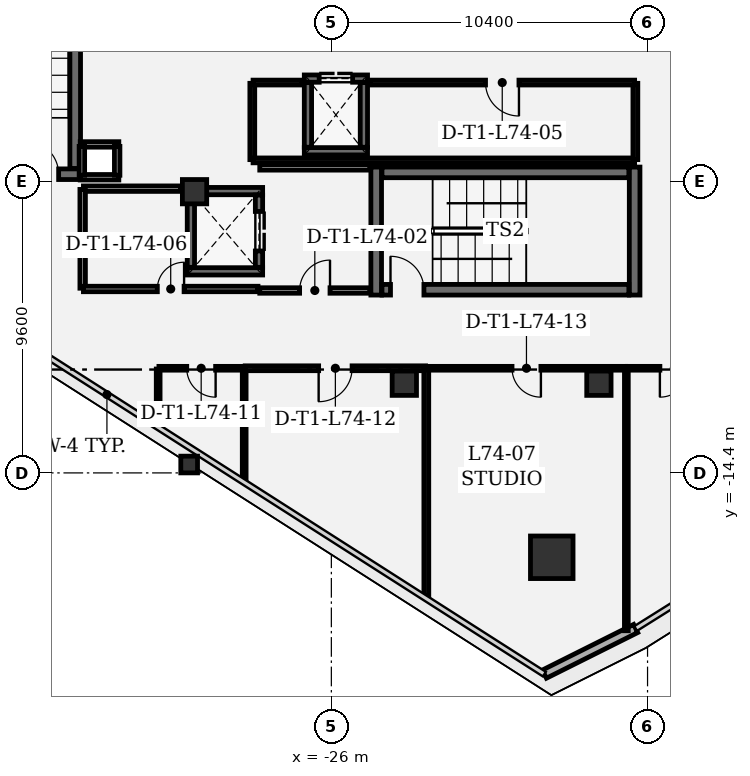
"""IFC4 building model, lengths in metres.
Left out: names, types, materials, properties, quantities, classifications, styles, units other than length and angle.
Written with IfcOpenShell. Run it as: python <this file> out.ifc"""

import sys

from ifc_helpers import new_model, si_unit, direction, frame, frame_2d, origin, origin_2d, place, context, subcontext, project, spatial, rectangle, extrude, element, fill, save


model = new_model("IFC4")
c1 = context("Model", 3, precision=1e-05, world=origin(), true_north=direction((0.0, 1.0)))
c2 = subcontext(c1, "Body", "Model", "MODEL_VIEW")
j1 = project(units=[si_unit("LENGTHUNIT", "METRE"), si_unit("PLANEANGLEUNIT", "RADIAN")], contexts=[c1])
p1 = place(None, origin())
s1 = spatial("IfcSite", under=j1, at=p1, CompositionType="ELEMENT")
p2 = place(p1, origin())
s2 = spatial("IfcBuilding", under=s1, at=p2, CompositionType="ELEMENT")
p3 = place(p2, frame((0.0, 0.0, 318.6)))
s3 = spatial("IfcBuildingStorey", under=s2, at=p3, CompositionType="ELEMENT", Elevation=318.6)
p4 = place(p3, frame((-18.75, -17.176, 0.0), z_axis=(0.0, 0.0, 1.0), x_axis=(1.0, 0.0, 0.0)))
e1 = element("IfcColumn", 1, at=p4, inside=s3, PredefinedType="COLUMN", context=c2, shape_type="SweptSolid", body=[
    extrude(rectangle(XDim=1.4, YDim=1.4, at=origin_2d()), origin(), (0.0, 0.0, 1.0), 4.2),
])
for number, where, z_axis, x_axis in (
    (2, (-17.2, -11.45, 0.0), (0.0, 0.0, 1.0), (1.0, 0.0, 0.0)),
    (3, (-23.6, -11.45, 0.0), (0.0, 0.0, 1.0), (1.0, 0.0, 0.0)),
    (4, (-30.5, -5.15, 0.0), (0.0, 0.0, 1.0), (1.0, 0.0, 0.0)),
):
    element("IfcColumn", number, at=place(p3, frame(where, z_axis=z_axis, x_axis=x_axis)), inside=s3, PredefinedType="COLUMN", context=c2, shape_type="SweptSolid", body=[
        extrude(rectangle(XDim=0.8, YDim=0.8, at=origin_2d()), origin(), (0.0, 0.0, 1.0), 4.2),
    ])
p5 = place(p3, frame((-30.677, -14.124, 0.0), z_axis=(0.0, 0.0, 1.0), x_axis=(1.0, 0.0, 0.0)))
e5 = element("IfcColumn", 5, at=p5, inside=s3, PredefinedType="COLUMN", context=c2, shape_type="SweptSolid", body=[
    extrude(rectangle(XDim=0.55, YDim=0.55, at=origin_2d()), origin(), (0.0, 0.0, 1.0), 4.2),
])
p6 = place(p3, frame((-15.991, -19.518, 0.0), z_axis=(0.0, 0.0, 1.0), x_axis=(-0.894441735477, -0.447184505362, 0.0)))
e6 = element("IfcWall", 6, at=p6, inside=s3, PredefinedType="SOLIDWALL", context=c2, shape_type="SweptSolid", body=[
    extrude(rectangle(XDim=3.357, YDim=0.3, at=frame_2d((1.678, 0.0))), origin(), (0.0, 0.0, 1.0), 3.91),
])
for number, where, z_axis, x_axis in (
    (7, (-24.525, -4.34, 0.0), (0.0, 0.0, 1.0), (0.0, -1.0, 0.0)),
    (8, (-16.025, -8.55, 0.0), (0.0, 0.0, 1.0), (0.0, 1.0, 0.0)),
):
    element("IfcWall", number, at=place(p3, frame(where, z_axis=z_axis, x_axis=x_axis)), inside=s3, PredefinedType="SHEAR", context=c2, shape_type="SweptSolid", body=[
        extrude(rectangle(XDim=4.21, YDim=0.35, at=frame_2d((2.105, 0.0))), origin(), (0.0, 0.0, 1.0), 3.91),
    ])
p7 = place(p3, frame((-24.335, -8.375, 0.0), z_axis=(0.0, 0.0, 1.0), x_axis=(1.0, 0.0, 0.0)))
e9 = element("IfcWall", 9, at=p7, inside=s3, PredefinedType="SHEAR", context=c2, shape_type="SweptSolid", body=[
    extrude(rectangle(XDim=8.12, YDim=0.35, at=frame_2d((4.06, 0.0))), origin(), (0.0, 0.0, 1.0), 3.91),
])
p8 = place(p7, frame((0.28, 0.0, 0.0)))
e10 = element("IfcOpeningElement", 10, at=p8, cuts=e9, PredefinedType="OPENING", context=c2, shape_type="SweptSolid", body=[
    extrude(rectangle(XDim=1.1, YDim=2.2, at=frame_2d((0.55, 1.1))), frame((0.0, 0.185, 0.0), z_axis=(0.0, -1.0, 0.0), x_axis=(1.0, 0.0, 0.0)), (0.0, 0.0, 1.0), 0.37),
])
p9 = place(p3, frame((-16.215, -4.515, 0.0), z_axis=(0.0, 0.0, 1.0), x_axis=(-1.0, 0.0, 0.0)))
e11 = element("IfcWall", 11, at=p9, inside=s3, PredefinedType="SHEAR", context=c2, shape_type="SweptSolid", body=[
    extrude(rectangle(XDim=8.12, YDim=0.35, at=frame_2d((4.06, 0.0))), origin(), (0.0, 0.0, 1.0), 3.91),
])
p10 = place(p3, frame((-38.46, -4.575, 0.0), z_axis=(0.0, 0.0, 1.0), x_axis=(1.0, 0.0, 0.0)))
e12 = element("IfcWall", 12, at=p10, inside=s3, PredefinedType="SHEAR", context=c2, shape_type="SweptSolid", body=[
    extrude(rectangle(XDim=4.21, YDim=0.35, at=frame_2d((2.105, 0.0))), origin(), (0.0, 0.0, 1.0), 3.91),
])
p11 = place(p10, frame((2.39, 0.0, 0.0)))
e13 = element("IfcOpeningElement", 13, at=p11, cuts=e12, PredefinedType="OPENING", context=c2, shape_type="SweptSolid", body=[
    extrude(rectangle(XDim=1.1, YDim=2.2, at=frame_2d((0.55, 1.1))), frame((0.0, 0.185, 0.0), z_axis=(0.0, -1.0, 0.0), x_axis=(1.0, 0.0, 0.0)), (0.0, 0.0, 1.0), 0.37),
])
p12 = place(p3, frame((-34.425, -4.385, 0.0), z_axis=(0.0, 0.0, 1.0), x_axis=(0.0, 1.0, 0.0)))
e14 = element("IfcWall", 14, at=p12, inside=s3, PredefinedType="SHEAR", context=c2, shape_type="SweptSolid", body=[
    extrude(rectangle(XDim=8.77, YDim=0.35, at=frame_2d((4.385, 0.0))), origin(), (0.0, 0.0, 1.0), 3.91),
])
for number, where, z_axis, x_axis in (
    (15, (-28.26, -7.77, 0.0), (0.0, 0.0, 1.0), (-1.0, 0.0, 0.0)),
    (16, (-30.74, -5.13, 0.0), (0.0, 0.0, 1.0), (1.0, 0.0, 0.0)),
):
    element("IfcWall", number, at=place(p3, frame(where, z_axis=z_axis, x_axis=x_axis)), inside=s3, PredefinedType="SHEAR", context=c2, shape_type="SweptSolid", body=[
        extrude(rectangle(XDim=2.48, YDim=0.24, at=frame_2d((1.24, 0.0))), origin(), (0.0, 0.0, 1.0), 3.91),
    ])
p13 = place(p3, frame((-30.62, -7.638, 0.0), z_axis=(0.0, 0.0, 1.0), x_axis=(0.0, 1.0, 0.0)))
e17 = element("IfcWall", 17, at=p13, inside=s3, PredefinedType="SHEAR", context=c2, shape_type="SweptSolid", body=[
    extrude(rectangle(XDim=2.376, YDim=0.24, at=frame_2d((1.188, 0.0))), origin(), (0.0, 0.0, 1.0), 3.91),
])
p14 = place(p3, frame((-28.38, -5.262, 0.0), z_axis=(0.0, 0.0, 1.0), x_axis=(0.0, -1.0, 0.0)))
e18 = element("IfcWall", 18, at=p14, inside=s3, PredefinedType="SHEAR", context=c2, shape_type="SweptSolid", body=[
    extrude(rectangle(XDim=2.376, YDim=0.24, at=frame_2d((1.188, 0.0))), origin(), (0.0, 0.0, 1.0), 3.91),
])
p15 = place(p14, frame((0.538, 0.0, 0.0)))
e19 = element("IfcOpeningElement", 19, at=p15, cuts=e18, PredefinedType="OPENING", context=c2, shape_type="SweptSolid", body=[
    extrude(rectangle(XDim=1.3, YDim=2.3, at=frame_2d((0.65, 1.15))), frame((0.0, 0.13, 0.0), z_axis=(0.0, -1.0, 0.0), x_axis=(1.0, 0.0, 0.0)), (0.0, 0.0, 1.0), 0.26),
])
p16 = place(p3, frame((-24.81, -3.82, 0.0), z_axis=(0.0, 0.0, 1.0), x_axis=(-1.0, 0.0, 0.0)))
e20 = element("IfcWall", 20, at=p16, inside=s3, PredefinedType="SHEAR", context=c2, shape_type="SweptSolid", body=[
    extrude(rectangle(XDim=2.08, YDim=0.24, at=frame_2d((1.04, 0.0))), origin(), (0.0, 0.0, 1.0), 3.91),
])
p17 = place(p3, frame((-26.89, -1.43, 0.0), z_axis=(0.0, 0.0, 1.0), x_axis=(1.0, 0.0, 0.0)))
e21 = element("IfcWall", 21, at=p17, inside=s3, PredefinedType="SHEAR", context=c2, shape_type="SweptSolid", body=[
    extrude(rectangle(XDim=2.08, YDim=0.24, at=frame_2d((1.04, 0.0))), origin(), (0.0, 0.0, 1.0), 3.91),
])
p18 = place(p17, frame((0.49, 0.0, 0.0)))
e22 = element("IfcOpeningElement", 22, at=p18, cuts=e21, PredefinedType="OPENING", context=c2, shape_type="SweptSolid", body=[
    extrude(rectangle(XDim=1.1, YDim=2.2, at=frame_2d((0.55, 1.1))), frame((0.0, 0.13, 0.0), z_axis=(0.0, -1.0, 0.0), x_axis=(1.0, 0.0, 0.0)), (0.0, 0.0, 1.0), 0.26),
])
for number, where, z_axis, x_axis in (
    (23, (-26.77, -3.688, 0.0), (0.0, 0.0, 1.0), (0.0, 1.0, 0.0)),
    (24, (-24.93, -1.562, 0.0), (0.0, 0.0, 1.0), (0.0, -1.0, 0.0)),
):
    element("IfcWall", number, at=place(p3, frame(where, z_axis=z_axis, x_axis=x_axis)), inside=s3, PredefinedType="SHEAR", context=c2, shape_type="SweptSolid", body=[
        extrude(rectangle(XDim=2.126, YDim=0.24, at=frame_2d((1.063, 0.0))), origin(), (0.0, 0.0, 1.0), 3.91),
    ])
for number, where, z_axis, x_axis in (
    (25, (-32.99, -4.675, 0.0), (0.0, 0.0, 1.0), (-1.0, 0.0, 0.0)),
    (26, (-34.26, -3.595, 0.0), (0.0, 0.0, 1.0), (1.0, 0.0, 0.0)),
):
    element("IfcWall", number, at=place(p3, frame(where, z_axis=z_axis, x_axis=x_axis)), inside=s3, PredefinedType="PARTITIONING", context=c2, shape_type="SweptSolid", body=[
        extrude(rectangle(XDim=1.27, YDim=0.18, at=frame_2d((0.635, 0.0))), origin(), (0.0, 0.0, 1.0), 3.91),
    ])
for number, where, z_axis, x_axis in (
    (27, (-34.205, -4.61, 0.0), (0.0, 0.0, 1.0), (0.0, 1.0, 0.0)),
    (28, (-33.045, -3.66, 0.0), (0.0, 0.0, 1.0), (0.0, -1.0, 0.0)),
):
    element("IfcWall", number, at=place(p3, frame(where, z_axis=z_axis, x_axis=x_axis)), inside=s3, PredefinedType="PARTITIONING", context=c2, shape_type="SweptSolid", body=[
        extrude(rectangle(XDim=0.95, YDim=0.18, at=frame_2d((0.475, 0.0))), origin(), (0.0, 0.0, 1.0), 3.91),
    ])
p19 = place(p3, frame((-28.355, -8.4, 0.0), z_axis=(0.0, 0.0, 1.0), x_axis=(1.0, 0.0, 0.0)))
e29 = element("IfcWall", 29, at=p19, inside=s3, PredefinedType="PARTITIONING", context=c2, shape_type="SweptSolid", body=[
    extrude(rectangle(XDim=3.622, YDim=0.18, at=frame_2d((1.811, 0.0))), origin(), (0.0, 0.0, 1.0), 3.529),
])
p20 = place(p19, frame((1.311, 0.0, 0.0)))
e30 = element("IfcOpeningElement", 30, at=p20, cuts=e29, PredefinedType="OPENING", context=c2, shape_type="SweptSolid", body=[
    extrude(rectangle(XDim=1.0, YDim=2.15, at=frame_2d((0.5, 1.075))), frame((0.0, 0.1, 0.0), z_axis=(0.0, -1.0, 0.0), x_axis=(1.0, 0.0, 0.0)), (0.0, 0.0, 1.0), 0.2),
])
p21 = place(p3, frame((-24.733, -4.35, 0.0), z_axis=(0.0, 0.0, 1.0), x_axis=(-1.0, 0.0, 0.0)))
e31 = element("IfcWall", 31, at=p21, inside=s3, PredefinedType="PARTITIONING", context=c2, shape_type="SweptSolid", body=[
    extrude(rectangle(XDim=3.622, YDim=0.18, at=frame_2d((1.811, 0.0))), origin(), (0.0, 0.0, 1.0), 3.91),
])
p22 = place(p3, frame((-28.6, -1.585, 0.0), z_axis=(0.0, 0.0, 1.0), x_axis=(0.0, -1.0, 0.0)))
e32 = element("IfcWall", 32, at=p22, inside=s3, PredefinedType="PARTITIONING", context=c2, shape_type="SweptSolid", body=[
    extrude(rectangle(XDim=2.51, YDim=0.16, at=frame_2d((1.255, 0.0))), origin(), (0.0, 0.0, 1.0), 3.91),
])
p23 = place(p3, frame((-28.575, -4.12, 0.0), z_axis=(0.0, 0.0, 1.0), x_axis=(1.0, 0.0, 0.0)))
e33 = element("IfcWall", 33, at=p23, inside=s3, PredefinedType="PARTITIONING", context=c2, shape_type="SweptSolid", body=[
    extrude(rectangle(XDim=12.55, YDim=0.16, at=frame_2d((6.275, 0.0))), origin(), (0.0, 0.0, 1.0), 3.91),
])
p24 = place(p3, frame((-16.0, -4.095, 0.0), z_axis=(0.0, 0.0, 1.0), x_axis=(0.0, 1.0, 0.0)))
e34 = element("IfcWall", 34, at=p24, inside=s3, PredefinedType="PARTITIONING", context=c2, shape_type="SweptSolid", body=[
    extrude(rectangle(XDim=2.51, YDim=0.16, at=frame_2d((1.255, 0.0))), origin(), (0.0, 0.0, 1.0), 3.91),
])
p25 = place(p3, frame((-16.025, -1.56, 0.0), z_axis=(0.0, 0.0, 1.0), x_axis=(-1.0, 0.0, 0.0)))
e35 = element("IfcWall", 35, at=p25, inside=s3, PredefinedType="PARTITIONING", context=c2, shape_type="SweptSolid", body=[
    extrude(rectangle(XDim=8.709, YDim=0.16, at=frame_2d((4.354, 0.0))), origin(), (0.0, 0.0, 1.0), 3.91),
])
p26 = place(p25, frame((3.804, 0.0, 0.0)))
e36 = element("IfcOpeningElement", 36, at=p26, cuts=e35, PredefinedType="OPENING", context=c2, shape_type="SweptSolid", body=[
    extrude(rectangle(XDim=1.1, YDim=2.15, at=frame_2d((0.55, 1.075))), frame((0.0, 0.09, 0.0), z_axis=(0.0, -1.0, 0.0), x_axis=(1.0, 0.0, 0.0)), (0.0, 0.0, 1.0), 0.18),
])
p27 = place(p3, frame((-26.966, -1.56, 0.0), z_axis=(0.0, 0.0, 1.0), x_axis=(-1.0, 0.0, 0.0)))
e37 = element("IfcWall", 37, at=p27, inside=s3, PredefinedType="PARTITIONING", context=c2, shape_type="SweptSolid", body=[
    extrude(rectangle(XDim=1.609, YDim=0.16, at=frame_2d((0.805, 0.0))), origin(), (0.0, 0.0, 1.0), 3.91),
])
p28 = place(p3, frame((-30.965, -5.05, 0.0), z_axis=(0.0, 0.0, 1.0), x_axis=(-1.0, 0.0, 0.0)))
e38 = element("IfcWall", 38, at=p28, inside=s3, PredefinedType="PARTITIONING", context=c2, shape_type="SweptSolid", body=[
    extrude(rectangle(XDim=3.19, YDim=0.18, at=frame_2d((1.595, 0.0))), origin(), (0.0, 0.0, 1.0), 3.91),
])
p29 = place(p3, frame((-34.18, -5.075, 0.0), z_axis=(0.0, 0.0, 1.0), x_axis=(0.0, -1.0, 0.0)))
e39 = element("IfcWall", 39, at=p29, inside=s3, PredefinedType="PARTITIONING", context=c2, shape_type="SweptSolid", body=[
    extrude(rectangle(XDim=3.25, YDim=0.18, at=frame_2d((1.625, 0.0))), origin(), (0.0, 0.0, 1.0), 3.91),
])
p30 = place(p3, frame((-34.155, -8.35, 0.0), z_axis=(0.0, 0.0, 1.0), x_axis=(1.0, 0.0, 0.0)))
e40 = element("IfcWall", 40, at=p30, inside=s3, PredefinedType="PARTITIONING", context=c2, shape_type="SweptSolid", body=[
    extrude(rectangle(XDim=5.742, YDim=0.18, at=frame_2d((2.871, 0.0))), origin(), (0.0, 0.0, 1.0), 3.13),
])
p31 = place(p30, frame((2.431, 0.0, 0.0)))
e41 = element("IfcOpeningElement", 41, at=p31, cuts=e40, PredefinedType="OPENING", context=c2, shape_type="SweptSolid", body=[
    extrude(rectangle(XDim=0.88, YDim=2.1, at=frame_2d((0.44, 1.05))), frame((0.0, 0.1, 0.0), z_axis=(0.0, -1.0, 0.0), x_axis=(1.0, 0.0, 0.0)), (0.0, 0.0, 1.0), 0.2),
])
p32 = place(p3, frame((-28.892, -10.958, 0.0), z_axis=(0.0, 0.0, 1.0), x_axis=(-1.0, 0.0, 0.0)))
e42 = element("IfcWall", 42, at=p32, inside=s3, PredefinedType="PARTITIONING", context=c2, shape_type="SweptSolid", body=[
    extrude(rectangle(XDim=2.78, YDim=0.125, at=frame_2d((1.39, 0.0))), origin(), (0.0, 0.0, 1.0), 3.13),
])
p33 = place(p32, frame((0.915, 0.0, 0.0)))
e43 = element("IfcOpeningElement", 43, at=p33, cuts=e42, PredefinedType="OPENING", context=c2, shape_type="SweptSolid", body=[
    extrude(rectangle(XDim=0.95, YDim=2.15, at=frame_2d((0.475, 1.075))), frame((0.0, 0.073, 0.0), z_axis=(0.0, -1.0, 0.0), x_axis=(1.0, 0.0, 0.0)), (0.0, 0.0, 1.0), 0.145),
])
p34 = place(p3, frame((-31.696, -10.983, 0.0), z_axis=(0.0, 0.0, 1.0), x_axis=(0.0, -1.0, 0.0)))
e44 = element("IfcWall", 44, at=p34, inside=s3, PredefinedType="PARTITIONING", context=c2, shape_type="SweptSolid", body=[
    extrude(rectangle(XDim=1.838, YDim=0.125, at=frame_2d((0.919, 0.0))), origin(), (0.0, 0.0, 1.0), 3.91),
])
p35 = place(p3, frame((-28.867, -14.629, 0.0), z_axis=(0.0, 0.0, 1.0), x_axis=(0.0, 1.0, 0.0)))
e45 = element("IfcWall", 45, at=p35, inside=s3, PredefinedType="PARTITIONING", context=c2, shape_type="SweptSolid", body=[
    extrude(rectangle(XDim=3.646, YDim=0.125, at=frame_2d((1.823, 0.0))), origin(), (0.0, 0.0, 1.0), 3.91),
])
p36 = place(p3, frame((-22.902, -10.958, 0.0), z_axis=(0.0, 0.0, 1.0), x_axis=(-1.0, 0.0, 0.0)))
e46 = element("IfcWall", 46, at=p36, inside=s3, PredefinedType="PARTITIONING", context=c2, shape_type="SweptSolid", body=[
    extrude(rectangle(XDim=5.932, YDim=0.16, at=frame_2d((2.966, 0.0))), origin(), (0.0, 0.0, 1.0), 3.13),
])
p37 = place(p36, frame((2.416, 0.0, 0.0)))
e47 = element("IfcOpeningElement", 47, at=p37, cuts=e46, PredefinedType="OPENING", context=c2, shape_type="SweptSolid", body=[
    extrude(rectangle(XDim=1.1, YDim=2.15, at=frame_2d((0.55, 1.075))), frame((0.0, 0.09, 0.0), z_axis=(0.0, -1.0, 0.0), x_axis=(1.0, 0.0, 0.0)), (0.0, 0.0, 1.0), 0.18),
])
p38 = place(p3, frame((-22.875, -18.458, 0.0), z_axis=(0.0, 0.0, 1.0), x_axis=(-0.000228616213, 0.999999973867, 0.0)))
e48 = element("IfcWall", 48, at=p38, inside=s3, PredefinedType="PARTITIONING", context=c2, shape_type="SweptSolid", body=[
    extrude(rectangle(XDim=7.475, YDim=0.16, at=frame_2d((3.738, 0.0))), origin(), (0.0, 0.0, 1.0), 3.91),
])
p39 = place(p3, frame((-16.322, -10.958, 0.0), z_axis=(0.0, 0.0, 1.0), x_axis=(-1.0, 0.0, 0.0)))
e49 = element("IfcWall", 49, at=p39, inside=s3, PredefinedType="PARTITIONING", context=c2, shape_type="SweptSolid", body=[
    extrude(rectangle(XDim=6.522, YDim=0.125, at=frame_2d((3.261, 0.0))), origin(), (0.0, 0.0, 1.0), 3.529),
])
p40 = place(p39, frame((2.786, 0.0, 0.0)))
e50 = element("IfcOpeningElement", 50, at=p40, cuts=e49, PredefinedType="OPENING", context=c2, shape_type="SweptSolid", body=[
    extrude(rectangle(XDim=0.95, YDim=2.15, at=frame_2d((0.475, 1.075))), frame((0.0, 0.073, 0.0), z_axis=(0.0, -1.0, 0.0), x_axis=(1.0, 0.0, 0.0)), (0.0, 0.0, 1.0), 0.145),
])
p41 = place(p3, frame((-16.297, -19.591, 0.0), z_axis=(0.0, 0.0, 1.0), x_axis=(8.5082246e-05, 0.999999996381, 0.0)))
e51 = element("IfcWall", 51, at=p41, inside=s3, PredefinedType="PARTITIONING", context=c2, shape_type="SweptSolid", body=[
    extrude(rectangle(XDim=8.608, YDim=0.125, at=frame_2d((4.304, 0.0))), origin(), (0.0, 0.0, 1.0), 3.13),
])
p42 = place(p3, frame((-13.175, -10.958, 0.0), z_axis=(0.0, 0.0, 1.0), x_axis=(-1.0, 0.0, 0.0)))
e52 = element("IfcWall", 52, at=p42, inside=s3, PredefinedType="PARTITIONING", context=c2, shape_type="SweptSolid", body=[
    extrude(rectangle(XDim=3.089, YDim=0.125, at=frame_2d((1.544, 0.0))), origin(), (0.0, 0.0, 1.0), 3.91),
])
p43 = place(p42, frame((1.069, 0.0, 0.0)))
e53 = element("IfcOpeningElement", 53, at=p43, cuts=e52, PredefinedType="OPENING", context=c2, shape_type="SweptSolid", body=[
    extrude(rectangle(XDim=0.95, YDim=2.15, at=frame_2d((0.475, 1.075))), frame((0.0, 0.073, 0.0), z_axis=(0.0, -1.0, 0.0), x_axis=(1.0, 0.0, 0.0)), (0.0, 0.0, 1.0), 0.145),
])
p44 = place(p8, origin())
e54 = element("IfcDoor", 54, at=p44, inside=s3, OperationType="SINGLE_SWING_LEFT", PredefinedType="DOOR", context=c2, shape_type="SweptSolid", body=[
    extrude(rectangle(XDim=1.1, YDim=2.2, at=frame_2d((0.55, 1.1))), frame((0.0, 0.025, 0.0), z_axis=(0.0, -1.0, 0.0), x_axis=(1.0, 0.0, 0.0)), (0.0, 0.0, 1.0), 0.05),
])
fill(e10, e54)
p45 = place(p11, origin())
e55 = element("IfcDoor", 55, at=p45, inside=s3, OperationType="SINGLE_SWING_LEFT", PredefinedType="DOOR", context=c2, shape_type="SweptSolid", body=[
    extrude(rectangle(XDim=1.1, YDim=2.2, at=frame_2d((0.55, 1.1))), frame((0.0, 0.025, 0.0), z_axis=(0.0, -1.0, 0.0), x_axis=(1.0, 0.0, 0.0)), (0.0, 0.0, 1.0), 0.05),
])
fill(e13, e55)
p46 = place(p15, origin())
e56 = element("IfcDoor", 56, at=p46, inside=s3, OperationType="DOUBLE_DOOR_SLIDING", PredefinedType="DOOR", context=c2, shape_type="SweptSolid", body=[
    extrude(rectangle(XDim=1.3, YDim=2.3, at=frame_2d((0.65, 1.15))), frame((0.0, 0.025, 0.0), z_axis=(0.0, -1.0, 0.0), x_axis=(1.0, 0.0, 0.0)), (0.0, 0.0, 1.0), 0.05),
])
fill(e19, e56)
p47 = place(p18, origin())
e57 = element("IfcDoor", 57, at=p47, inside=s3, OperationType="DOUBLE_DOOR_SLIDING", PredefinedType="DOOR", context=c2, shape_type="SweptSolid", body=[
    extrude(rectangle(XDim=1.1, YDim=2.2, at=frame_2d((0.55, 1.1))), frame((0.0, 0.025, 0.0), z_axis=(0.0, -1.0, 0.0), x_axis=(1.0, 0.0, 0.0)), (0.0, 0.0, 1.0), 0.05),
])
fill(e22, e57)
p48 = place(p20, origin())
e58 = element("IfcDoor", 58, at=p48, inside=s3, OperationType="SINGLE_SWING_RIGHT", PredefinedType="DOOR", context=c2, shape_type="SweptSolid", body=[
    extrude(rectangle(XDim=1.0, YDim=2.15, at=frame_2d((0.5, 1.075))), frame((0.0, 0.025, 0.0), z_axis=(0.0, -1.0, 0.0), x_axis=(1.0, 0.0, 0.0)), (0.0, 0.0, 1.0), 0.05),
])
fill(e30, e58)
p49 = place(p26, origin())
e59 = element("IfcDoor", 59, at=p49, inside=s3, OperationType="SINGLE_SWING_LEFT", PredefinedType="DOOR", context=c2, shape_type="SweptSolid", body=[
    extrude(rectangle(XDim=1.1, YDim=2.15, at=frame_2d((0.55, 1.075))), frame((0.0, 0.025, 0.0), z_axis=(0.0, -1.0, 0.0), x_axis=(1.0, 0.0, 0.0)), (0.0, 0.0, 1.0), 0.05),
])
fill(e36, e59)
p50 = place(p31, origin())
e60 = element("IfcDoor", 60, at=p50, inside=s3, OperationType="SINGLE_SWING_RIGHT", PredefinedType="DOOR", context=c2, shape_type="SweptSolid", body=[
    extrude(rectangle(XDim=0.88, YDim=2.1, at=frame_2d((0.44, 1.05))), frame((0.0, 0.025, 0.0), z_axis=(0.0, -1.0, 0.0), x_axis=(1.0, 0.0, 0.0)), (0.0, 0.0, 1.0), 0.05),
])
fill(e41, e60)
p51 = place(p33, origin())
e61 = element("IfcDoor", 61, at=p51, inside=s3, OperationType="SINGLE_SWING_LEFT", PredefinedType="DOOR", context=c2, shape_type="SweptSolid", body=[
    extrude(rectangle(XDim=0.95, YDim=2.15, at=frame_2d((0.475, 1.075))), frame((0.0, 0.025, 0.0), z_axis=(0.0, -1.0, 0.0), x_axis=(1.0, 0.0, 0.0)), (0.0, 0.0, 1.0), 0.05),
])
fill(e43, e61)
p52 = place(p37, origin())
e62 = element("IfcDoor", 62, at=p52, inside=s3, OperationType="SINGLE_SWING_RIGHT", PredefinedType="DOOR", context=c2, shape_type="SweptSolid", body=[
    extrude(rectangle(XDim=1.1, YDim=2.15, at=frame_2d((0.55, 1.075))), frame((0.0, 0.025, 0.0), z_axis=(0.0, -1.0, 0.0), x_axis=(1.0, 0.0, 0.0)), (0.0, 0.0, 1.0), 0.05),
])
fill(e47, e62)
p53 = place(p40, origin())
e63 = element("IfcDoor", 63, at=p53, inside=s3, OperationType="SINGLE_SWING_LEFT", PredefinedType="DOOR", context=c2, shape_type="SweptSolid", body=[
    extrude(rectangle(XDim=0.95, YDim=2.15, at=frame_2d((0.475, 1.075))), frame((0.0, 0.025, 0.0), z_axis=(0.0, -1.0, 0.0), x_axis=(1.0, 0.0, 0.0)), (0.0, 0.0, 1.0), 0.05),
])
fill(e50, e63)
p54 = place(p43, origin())
e64 = element("IfcDoor", 64, at=p54, inside=s3, OperationType="SINGLE_SWING_RIGHT", PredefinedType="DOOR", context=c2, shape_type="SweptSolid", body=[
    extrude(rectangle(XDim=0.95, YDim=2.15, at=frame_2d((0.475, 1.075))), frame((0.0, 0.025, 0.0), z_axis=(0.0, -1.0, 0.0), x_axis=(1.0, 0.0, 0.0)), (0.0, 0.0, 1.0), 0.05),
])
fill(e53, e64)
save(model, sys.argv[1])
